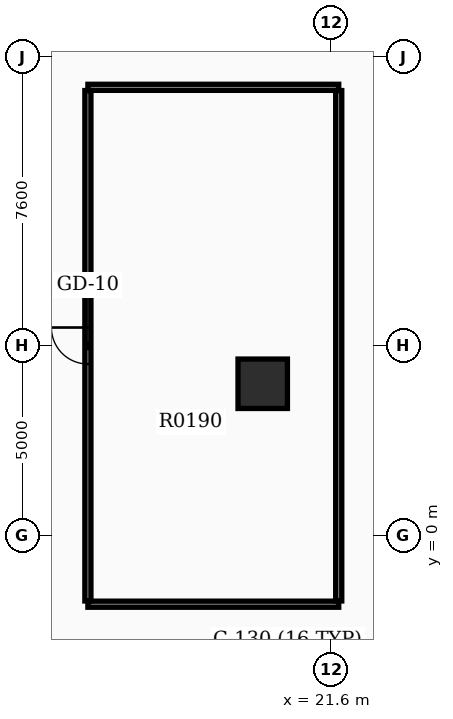
"""IFC4 building model, lengths in metres.
Left out: names, types, materials, properties, quantities, classifications, styles, units other than length and angle.
Written with IfcOpenShell. Run it as: python <this file> out.ifc"""

import sys

from ifc_helpers import new_model, si_unit, direction, frame, frame_2d, origin, origin_2d, place, context, subcontext, project, spatial, rectangle, extrude, element, fill, save


model = new_model("IFC4")
c1 = context("Model", 3, precision=1e-05, world=origin(), true_north=direction((0.0, 1.0)))
c2 = subcontext(c1, "Body", "Model", "MODEL_VIEW")
j1 = project(units=[si_unit("LENGTHUNIT", "METRE"), si_unit("PLANEANGLEUNIT", "RADIAN")], contexts=[c1])
p1 = place(None, origin())
s1 = spatial("IfcSite", under=j1, at=p1, CompositionType="ELEMENT")
p2 = place(p1, origin())
s2 = spatial("IfcBuilding", under=s1, at=p2, CompositionType="ELEMENT")
p3 = place(p2, frame((0.0, 0.0, 10.2)))
s3 = spatial("IfcBuildingStorey", under=s2, at=p3, CompositionType="ELEMENT", Elevation=10.2)
p4 = place(p3, frame((19.8, 4.0, 0.0), z_axis=(0.0, 0.0, 1.0), x_axis=(1.0, 0.0, 0.0)))
e1 = element("IfcColumn", 1, at=p4, inside=s3, PredefinedType="COLUMN", context=c2, shape_type="SweptSolid", body=[
    extrude(rectangle(XDim=1.3, YDim=1.3, at=origin_2d()), origin(), (0.0, 0.0, 1.0), 4.5),
])
for number, where, z_axis, x_axis in (
    (2, (15.2, -1.8, 0.0), (0.0, 0.0, 1.0), (1.0, 0.0, 0.0)),
    (3, (15.2, 11.8, 0.0), (0.0, 0.0, 1.0), (1.0, 0.0, 0.0)),
):
    element("IfcWall", number, at=place(p3, frame(where, z_axis=z_axis, x_axis=x_axis)), inside=s3, PredefinedType="PARTITIONING", context=c2, shape_type="SweptSolid", body=[
        extrude(rectangle(XDim=6.6, YDim=0.16, at=frame_2d((3.3, 0.0))), origin(), (0.0, 0.0, 1.0), 3.32),
    ])
p5 = place(p3, frame((15.2, -1.715, 0.0), z_axis=(0.0, 0.0, 1.0), x_axis=(0.0, 1.0, 0.0)))
e4 = element("IfcWall", 4, at=p5, inside=s3, PredefinedType="PARTITIONING", context=c2, shape_type="SweptSolid", body=[
    extrude(rectangle(XDim=13.43, YDim=0.16, at=frame_2d((6.715, 0.0))), origin(), (0.0, 0.0, 1.0), 3.32),
])
p6 = place(p5, frame((6.235, 0.0, 0.0)))
e5 = element("IfcOpeningElement", 5, at=p6, cuts=e4, PredefinedType="OPENING", context=c2, shape_type="SweptSolid", body=[
    extrude(rectangle(XDim=0.96, YDim=2.15, at=frame_2d((0.48, 1.075))), frame((0.0, 0.09, 0.0), z_axis=(0.0, -1.0, 0.0), x_axis=(1.0, 0.0, 0.0)), (0.0, 0.0, 1.0), 0.18),
])
p7 = place(p3, frame((21.8, -1.715, 0.0), z_axis=(0.0, 0.0, 1.0), x_axis=(0.0, 1.0, 0.0)))
e6 = element("IfcWall", 6, at=p7, inside=s3, PredefinedType="PARTITIONING", context=c2, shape_type="SweptSolid", body=[
    extrude(rectangle(XDim=13.43, YDim=0.16, at=frame_2d((6.715, 0.0))), origin(), (0.0, 0.0, 1.0), 3.32),
])
p8 = place(p6, origin())
e7 = element("IfcDoor", 7, at=p8, inside=s3, OperationType="SINGLE_SWING_RIGHT", PredefinedType="DOOR", context=c2, shape_type="SweptSolid", body=[
    extrude(rectangle(XDim=0.96, YDim=2.15, at=frame_2d((0.48, 1.075))), frame((0.0, 0.025, 0.0), z_axis=(0.0, -1.0, 0.0), x_axis=(1.0, 0.0, 0.0)), (0.0, 0.0, 1.0), 0.05),
])
fill(e5, e7)
save(model, sys.argv[1])
